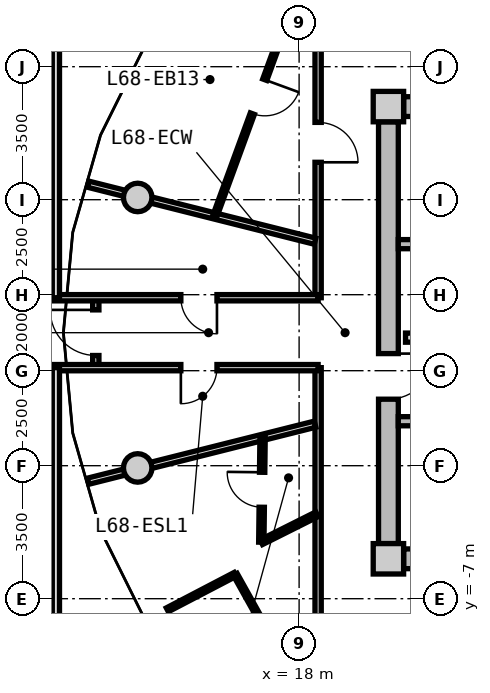
"""IFC4 building model, lengths in metres.
Left out: names, types, materials, properties, quantities, classifications, styles, units other than length and angle.
Written with IfcOpenShell. Run it as: python <this file> out.ifc"""

import sys

from ifc_helpers import new_model, si_unit, direction, frame, frame_2d, origin, origin_2d, place, context, subcontext, project, spatial, rectangle, circle, extrude, source, transform, mapped, element, fill, save


model = new_model("IFC4")
c1 = context("Model", 3, precision=1e-05, world=origin(), true_north=direction((0.0, 1.0)))
c2 = subcontext(c1, "Body", "Model", "MODEL_VIEW")
j1 = project(units=[si_unit("LENGTHUNIT", "METRE"), si_unit("PLANEANGLEUNIT", "RADIAN")], contexts=[c1])
p1 = place(None, origin())
s1 = spatial("IfcSite", under=j1, at=p1, CompositionType="ELEMENT")
p2 = place(p1, origin())
s2 = spatial("IfcBuilding", under=s1, at=p2, CompositionType="ELEMENT")
p3 = place(p2, frame((0.0, 0.0, 220.0)))
s3 = spatial("IfcBuildingStorey", under=s2, at=p3, CompositionType="ELEMENT", Elevation=220.0)
m1 = source(origin(), c2, "Body", "SweptSolid", [
    extrude(rectangle(XDim=0.8, YDim=0.8, at=origin_2d()), origin(), (0.0, 0.0, 1.0), 3.05),
])
for number, where, z_axis, x_axis in (
    (1, (20.35, -5.95, 0.0), (0.0, 0.0, 1.0), (1.0, 0.0, 0.0)),
    (2, (20.35, 5.95, 0.0), (0.0, 0.0, 1.0), (1.0, 0.0, 0.0)),
):
    element("IfcColumn", number, at=place(p3, frame(where, z_axis=z_axis, x_axis=x_axis)), inside=s3, PredefinedType="COLUMN", context=c2, shape_type="MappedRepresentation", body=[
        mapped(m1, transform((0.0, 0.0, 0.0), x_axis=(1.0, 0.0, 0.0), y_axis=(0.0, 1.0, 0.0), z_axis=(0.0, 0.0, 1.0), scale=1.0)),
    ])
m2 = source(origin(), c2, "Body", "SweptSolid", [
    extrude(rectangle(XDim=14.5, YDim=0.52, at=frame_2d((7.25, 0.0))), origin(), (0.0, 0.0, 1.0), 2.76),
])
for number, where, z_axis, x_axis in (
    (3, (20.75, 5.95, 0.0), (0.0, 0.0, 1.0), (1.0, 0.0, 0.0)),
    (4, (35.25, -5.95, 0.0), (0.0, 0.0, 1.0), (-1.0, 0.0, 0.0)),
):
    element("IfcWall", number, at=place(p3, frame(where, z_axis=z_axis, x_axis=x_axis)), inside=s3, PredefinedType="SHEAR", context=c2, shape_type="MappedRepresentation", body=[
        mapped(m2, transform((0.0, 0.0, 0.0), x_axis=(1.0, 0.0, 0.0), y_axis=(0.0, 1.0, 0.0), z_axis=(0.0, 0.0, 1.0), scale=1.0)),
    ])
m3 = source(origin(), c2, "Body", "SweptSolid", [
    extrude(rectangle(XDim=11.1, YDim=0.52, at=frame_2d((5.55, 0.0))), origin(), (0.0, 0.0, 1.0), 2.76),
])
p4 = place(p3, frame((20.35, -5.55, 0.0), z_axis=(0.0, 0.0, 1.0), x_axis=(0.0, 1.0, 0.0)))
e5 = element("IfcWall", 5, at=p4, inside=s3, PredefinedType="SHEAR", context=c2, shape_type="MappedRepresentation", body=[
    mapped(m3, transform((0.0, 0.0, 0.0), x_axis=(1.0, 0.0, 0.0), y_axis=(0.0, 1.0, 0.0), z_axis=(0.0, 0.0, 1.0), scale=1.0)),
])
p5 = place(p4, frame((3.8, 0.0, 0.0)))
e6 = element("IfcOpeningElement", 6, at=p5, cuts=e5, PredefinedType="OPENING", context=c2, shape_type="SweptSolid", body=[
    extrude(rectangle(XDim=1.2, YDim=2.15, at=frame_2d((0.6, 1.075))), frame((0.0, 0.27, 0.0), z_axis=(0.0, -1.0, 0.0), x_axis=(1.0, 0.0, 0.0)), (0.0, 0.0, 1.0), 0.54),
])
m4 = source(origin(), c2, "Body", "SweptSolid", [
    extrude(circle(Radius=0.375, at=origin_2d()), origin(), (0.0, 0.0, 1.0), 3.05),
])
for number, where, z_axis, x_axis in (
    (7, (13.753, 3.559, 0.0), (0.0, 0.0, 1.0), (1.0, 0.0, 0.0)),
    (8, (13.753, -3.559, 0.0), (0.0, 0.0, 1.0), (1.0, 0.0, 0.0)),
):
    element("IfcColumn", number, at=place(p3, frame(where, z_axis=z_axis, x_axis=x_axis)), inside=s3, PredefinedType="COLUMN", context=c2, shape_type="MappedRepresentation", body=[
        mapped(m4, transform((0.0, 0.0, 0.0), x_axis=(1.0, 0.0, 0.0), y_axis=(0.0, 1.0, 0.0), z_axis=(0.0, 0.0, 1.0), scale=1.0)),
    ])
m5 = source(origin(), c2, "Body", "SweptSolid", [
    extrude(rectangle(XDim=7.93, YDim=0.24, at=frame_2d((3.965, 0.0))), origin(), (0.0, 0.0, 1.0), 2.76),
])
p6 = place(p3, frame((20.61, 2.33, 0.0), z_axis=(0.0, 0.0, 1.0), x_axis=(1.0, 0.0, 0.0)))
e9 = element("IfcWall", 9, at=p6, inside=s3, PredefinedType="PARTITIONING", context=c2, shape_type="MappedRepresentation", body=[
    mapped(m5, transform((0.0, 0.0, 0.0), x_axis=(1.0, 0.0, 0.0), y_axis=(0.0, 1.0, 0.0), z_axis=(0.0, 0.0, 1.0), scale=1.0)),
])
p7 = place(p3, frame((20.61, -2.33, 0.0), z_axis=(0.0, 0.0, 1.0), x_axis=(1.0, 0.0, 0.0)))
e10 = element("IfcWall", 10, at=p7, inside=s3, PredefinedType="PARTITIONING", context=c2, shape_type="MappedRepresentation", body=[
    mapped(m5, transform((0.0, 0.0, 0.0), x_axis=(1.0, 0.0, 0.0), y_axis=(0.0, 1.0, 0.0), z_axis=(0.0, 0.0, 1.0), scale=1.0)),
])
p8 = place(p7, frame((1.05, 0.0, 0.0)))
e11 = element("IfcOpeningElement", 11, at=p8, cuts=e10, PredefinedType="OPENING", context=c2, shape_type="SweptSolid", body=[
    extrude(rectangle(XDim=1.1, YDim=2.15, at=frame_2d((0.55, 1.075))), frame((0.0, 0.13, 0.0), z_axis=(0.0, -1.0, 0.0), x_axis=(1.0, 0.0, 0.0)), (0.0, 0.0, 1.0), 0.26),
])
m6 = source(origin(), c2, "Body", "SweptSolid", [
    extrude(rectangle(XDim=7.62, YDim=0.24, at=frame_2d((3.81, 0.0))), origin(), (0.0, 0.0, 1.0), 2.745),
])
p9 = place(p3, frame((20.8, -0.13, 0.0), z_axis=(0.0, 0.0, 1.0), x_axis=(1.0, 0.0, 0.0)))
e12 = element("IfcWall", 12, at=p9, inside=s3, PredefinedType="PARTITIONING", context=c2, shape_type="MappedRepresentation", body=[
    mapped(m6, transform((0.0, 0.0, 0.0), x_axis=(1.0, 0.0, 0.0), y_axis=(0.0, 1.0, 0.0), z_axis=(0.0, 0.0, 1.0), scale=1.0)),
])
p10 = place(p9, frame((6.22, 0.0, 0.0)))
e13 = element("IfcOpeningElement", 13, at=p10, cuts=e12, PredefinedType="OPENING", context=c2, shape_type="SweptSolid", body=[
    extrude(rectangle(XDim=1.0, YDim=2.1, at=frame_2d((0.5, 1.05))), frame((0.0, 0.13, 0.0), z_axis=(0.0, -1.0, 0.0), x_axis=(1.0, 0.0, 0.0)), (0.0, 0.0, 1.0), 0.26),
])
p11 = place(p9, frame((2.4, 0.0, 0.0)))
e14 = element("IfcOpeningElement", 14, at=p11, cuts=e12, PredefinedType="OPENING", context=c2, shape_type="SweptSolid", body=[
    extrude(rectangle(XDim=1.0, YDim=2.1, at=frame_2d((0.5, 1.05))), frame((0.0, 0.13, 0.0), z_axis=(0.0, -1.0, 0.0), x_axis=(1.0, 0.0, 0.0)), (0.0, 0.0, 1.0), 0.26),
])
m7 = source(origin(), c2, "Body", "SweptSolid", [
    extrude(rectangle(XDim=6.88, YDim=0.165, at=frame_2d((3.44, 0.0))), origin(), (0.0, 0.0, 1.0), 2.745),
])
p12 = place(p3, frame((18.5, -7.8, 0.0), z_axis=(0.0, 0.0, 1.0), x_axis=(0.0, 1.0, 0.0)))
e15 = element("IfcWall", 15, at=p12, inside=s3, PredefinedType="PARTITIONING", context=c2, shape_type="MappedRepresentation", body=[
    mapped(m7, transform((0.0, 0.0, 0.0), x_axis=(1.0, 0.0, 0.0), y_axis=(0.0, 1.0, 0.0), z_axis=(0.0, 0.0, 1.0), scale=1.0)),
])
p13 = place(p3, frame((18.5, 0.92, 0.0), z_axis=(0.0, 0.0, 1.0), x_axis=(0.0, 1.0, 0.0)))
e16 = element("IfcWall", 16, at=p13, inside=s3, PredefinedType="PARTITIONING", context=c2, shape_type="MappedRepresentation", body=[
    mapped(m7, transform((0.0, 0.0, 0.0), x_axis=(1.0, 0.0, 0.0), y_axis=(0.0, 1.0, 0.0), z_axis=(0.0, 0.0, 1.0), scale=1.0)),
])
p14 = place(p13, frame((3.564, 0.0, 0.0)))
e17 = element("IfcOpeningElement", 17, at=p14, cuts=e16, PredefinedType="OPENING", context=c2, shape_type="SweptSolid", body=[
    extrude(rectangle(XDim=1.05, YDim=2.15, at=frame_2d((0.525, 1.075))), frame((0.0, 0.093, 0.0), z_axis=(0.0, -1.0, 0.0), x_axis=(1.0, 0.0, 0.0)), (0.0, 0.0, 1.0), 0.185),
])
m8 = source(origin(), c2, "Body", "SweptSolid", [
    extrude(rectangle(XDim=6.157, YDim=0.165, at=frame_2d((3.079, 0.0))), origin(), (0.0, 0.0, 1.0), 2.345),
])
for number, where, z_axis, x_axis in (
    (18, (18.42, 2.407, 0.0), (0.0, 0.0, 1.0), (-0.97, 0.244, 0.0)),
    (19, (18.42, -2.407, 0.0), (0.0, 0.0, 1.0), (-0.97, -0.244, 0.0)),
):
    element("IfcWall", number, at=place(p3, frame(where, z_axis=z_axis, x_axis=x_axis)), inside=s3, PredefinedType="PARTITIONING", context=c2, shape_type="MappedRepresentation", body=[
        mapped(m8, transform((0.0, 0.0, 0.0), x_axis=(1.0, 0.0, 0.0), y_axis=(0.0, 1.0, 0.0), z_axis=(0.0, 0.0, 1.0), scale=1.0)),
    ])
m9 = source(origin(), c2, "Body", "SweptSolid", [
    extrude(rectangle(XDim=6.69, YDim=0.115, at=frame_2d((3.345, 0.0))), origin(), (0.0, 0.0, 1.0), 2.745),
])
p15 = place(p3, frame((18.083, 9.352, 0.0), z_axis=(0.0, 0.0, 1.0), x_axis=(-0.343693784919, -0.939081776102, 0.0)))
e20 = element("IfcWall", 20, at=p15, inside=s3, PredefinedType="PARTITIONING", context=c2, shape_type="MappedRepresentation", body=[
    mapped(m9, transform((0.0, 0.0, 0.0), x_axis=(1.0, 0.0, 0.0), y_axis=(0.0, 1.0, 0.0), z_axis=(0.0, 0.0, 1.0), scale=1.0)),
])
p16 = place(p15, frame((2.87, 0.0, 0.0)))
e21 = element("IfcOpeningElement", 21, at=p16, cuts=e20, PredefinedType="OPENING", context=c2, shape_type="SweptSolid", body=[
    extrude(rectangle(XDim=0.95, YDim=2.1, at=frame_2d((0.475, 1.05))), frame((0.0, 0.067, 0.0), z_axis=(0.0, -1.0, 0.0), x_axis=(1.0, 0.0, 0.0)), (0.0, 0.0, 1.0), 0.135),
])
m10 = source(origin(), c2, "Body", "SweptSolid", [
    extrude(rectangle(XDim=1.638, YDim=0.14, at=frame_2d((0.819, 0.0))), origin(), (0.0, 0.0, 1.0), 2.745),
])
p17 = place(p3, frame((18.47, -4.778, 0.0), z_axis=(0.0, 0.0, 1.0), x_axis=(-0.893919977945, -0.448226586707, 0.0)))
e22 = element("IfcWall", 22, at=p17, inside=s3, PredefinedType="PARTITIONING", context=c2, shape_type="MappedRepresentation", body=[
    mapped(m10, transform((0.0, 0.0, 0.0), x_axis=(1.0, 0.0, 0.0), y_axis=(0.0, 1.0, 0.0), z_axis=(0.0, 0.0, 1.0), scale=1.0)),
])
m11 = source(origin(), c2, "Body", "SweptSolid", [
    extrude(rectangle(XDim=2.759, YDim=0.14, at=frame_2d((1.379, 0.0))), origin(), (0.0, 0.0, 1.0), 2.745),
])
p18 = place(p3, frame((17.005, -5.513, 0.0), z_axis=(0.0, 0.0, 1.0), x_axis=(0.01194710728, 0.999928630767, 0.0)))
e23 = element("IfcWall", 23, at=p18, inside=s3, PredefinedType="PARTITIONING", context=c2, shape_type="MappedRepresentation", body=[
    mapped(m11, transform((0.0, 0.0, 0.0), x_axis=(1.0, 0.0, 0.0), y_axis=(0.0, 1.0, 0.0), z_axis=(0.0, 0.0, 1.0), scale=1.0)),
])
p19 = place(p18, frame((0.919, 0.0, 0.0)))
e24 = element("IfcOpeningElement", 24, at=p19, cuts=e23, PredefinedType="OPENING", context=c2, shape_type="SweptSolid", body=[
    extrude(rectangle(XDim=0.92, YDim=2.1, at=frame_2d((0.46, 1.05))), frame((0.0, 0.08, 0.0), z_axis=(0.0, -1.0, 0.0), x_axis=(1.0, 0.0, 0.0)), (0.0, 0.0, 1.0), 0.16),
])
m12 = source(origin(), c2, "Body", "SweptSolid", [
    extrude(rectangle(XDim=2.015, YDim=0.115, at=frame_2d((1.007, 0.0))), origin(), (0.0, 0.0, 1.0), 2.745),
])
p20 = place(p3, frame((16.318, -6.36, 0.0), z_axis=(0.0, 0.0, 1.0), x_axis=(-0.886437892009, -0.462847559797, 0.0)))
e25 = element("IfcWall", 25, at=p20, inside=s3, PredefinedType="PARTITIONING", context=c2, shape_type="MappedRepresentation", body=[
    mapped(m12, transform((0.0, 0.0, 0.0), x_axis=(1.0, 0.0, 0.0), y_axis=(0.0, 1.0, 0.0), z_axis=(0.0, 0.0, 1.0), scale=1.0)),
])
m13 = source(origin(), c2, "Body", "SweptSolid", [
    extrude(rectangle(XDim=3.493, YDim=0.115, at=frame_2d((1.746, 0.0))), origin(), (0.0, 0.0, 1.0), 2.745),
])
p21 = place(p3, frame((16.318, -6.36, 0.0), z_axis=(0.0, 0.0, 1.0), x_axis=(0.487896553961, -0.872901456427, 0.0)))
e26 = element("IfcWall", 26, at=p21, inside=s3, PredefinedType="PARTITIONING", context=c2, shape_type="MappedRepresentation", body=[
    mapped(m13, transform((0.0, 0.0, 0.0), x_axis=(1.0, 0.0, 0.0), y_axis=(0.0, 1.0, 0.0), z_axis=(0.0, 0.0, 1.0), scale=1.0)),
])
p22 = place(p21, frame((1.271, 0.0, 0.0)))
e27 = element("IfcOpeningElement", 27, at=p22, cuts=e26, PredefinedType="OPENING", context=c2, shape_type="SweptSolid", body=[
    extrude(rectangle(XDim=0.95, YDim=2.1, at=frame_2d((0.475, 1.05))), frame((0.0, 0.067, 0.0), z_axis=(0.0, -1.0, 0.0), x_axis=(1.0, 0.0, 0.0)), (0.0, 0.0, 1.0), 0.135),
])
m14 = source(origin(), c2, "Body", "SweptSolid", [
    extrude(rectangle(XDim=1.84, YDim=0.165, at=frame_2d((0.92, 0.0))), origin(), (0.0, 0.0, 1.0), 2.745),
])
p23 = place(p3, frame((12.65, -0.92, 0.0), z_axis=(0.0, 0.0, 1.0), x_axis=(0.0, 1.0, 0.0)))
e28 = element("IfcWall", 28, at=p23, inside=s3, PredefinedType="PARTITIONING", context=c2, shape_type="MappedRepresentation", body=[
    mapped(m14, transform((0.0, 0.0, 0.0), x_axis=(1.0, 0.0, 0.0), y_axis=(0.0, 1.0, 0.0), z_axis=(0.0, 0.0, 1.0), scale=1.0)),
])
p24 = place(p23, frame((0.32, 0.0, 0.0)))
e29 = element("IfcOpeningElement", 29, at=p24, cuts=e28, PredefinedType="OPENING", context=c2, shape_type="SweptSolid", body=[
    extrude(rectangle(XDim=1.2, YDim=2.15, at=frame_2d((0.6, 1.075))), frame((0.0, 0.093, 0.0), z_axis=(0.0, -1.0, 0.0), x_axis=(1.0, 0.0, 0.0)), (0.0, 0.0, 1.0), 0.185),
])
m15 = source(origin(), c2, "Body", "SweptSolid", [
    extrude(rectangle(XDim=37.0, YDim=0.165, at=frame_2d((18.5, 0.0))), origin(), (0.0, 0.0, 1.0), 2.745),
])
p25 = place(p3, frame((-18.5, -0.92, 0.0), z_axis=(0.0, 0.0, 1.0), x_axis=(1.0, 0.0, 0.0)))
e30 = element("IfcWall", 30, at=p25, inside=s3, PredefinedType="PARTITIONING", context=c2, shape_type="MappedRepresentation", body=[
    mapped(m15, transform((0.0, 0.0, 0.0), x_axis=(1.0, 0.0, 0.0), y_axis=(0.0, 1.0, 0.0), z_axis=(0.0, 0.0, 1.0), scale=1.0)),
])
p26 = place(p25, frame((2.662, 0.0, 0.0)))
e31 = element("IfcOpeningElement", 31, at=p26, cuts=e30, PredefinedType="OPENING", context=c2, shape_type="SweptSolid", body=[
    extrude(rectangle(XDim=0.95, YDim=2.1, at=frame_2d((0.475, 1.05))), frame((0.0, 0.093, 0.0), z_axis=(0.0, -1.0, 0.0), x_axis=(1.0, 0.0, 0.0)), (0.0, 0.0, 1.0), 0.185),
])
p27 = place(p25, frame((33.388, 0.0, 0.0)))
e32 = element("IfcOpeningElement", 32, at=p27, cuts=e30, PredefinedType="OPENING", context=c2, shape_type="SweptSolid", body=[
    extrude(rectangle(XDim=0.95, YDim=2.1, at=frame_2d((0.475, 1.05))), frame((0.0, 0.093, 0.0), z_axis=(0.0, -1.0, 0.0), x_axis=(1.0, 0.0, 0.0)), (0.0, 0.0, 1.0), 0.185),
])
p28 = place(p25, frame((9.075, 0.0, 0.0)))
e33 = element("IfcOpeningElement", 33, at=p28, cuts=e30, PredefinedType="OPENING", context=c2, shape_type="SweptSolid", body=[
    extrude(rectangle(XDim=1.25, YDim=2.2, at=frame_2d((0.625, 1.1))), frame((0.0, 0.093, 0.0), z_axis=(0.0, -1.0, 0.0), x_axis=(1.0, 0.0, 0.0)), (0.0, 0.0, 1.0), 0.185),
])
p29 = place(p25, frame((14.875, 0.0, 0.0)))
e34 = element("IfcOpeningElement", 34, at=p29, cuts=e30, PredefinedType="OPENING", context=c2, shape_type="SweptSolid", body=[
    extrude(rectangle(XDim=1.25, YDim=2.2, at=frame_2d((0.625, 1.1))), frame((0.0, 0.093, 0.0), z_axis=(0.0, -1.0, 0.0), x_axis=(1.0, 0.0, 0.0)), (0.0, 0.0, 1.0), 0.185),
])
p30 = place(p25, frame((23.03, 0.0, 0.0)))
e35 = element("IfcOpeningElement", 35, at=p30, cuts=e30, PredefinedType="OPENING", context=c2, shape_type="SweptSolid", body=[
    extrude(rectangle(XDim=1.25, YDim=2.2, at=frame_2d((0.625, 1.1))), frame((0.0, 0.093, 0.0), z_axis=(0.0, -1.0, 0.0), x_axis=(1.0, 0.0, 0.0)), (0.0, 0.0, 1.0), 0.185),
])
p31 = place(p3, frame((-18.5, 0.92, 0.0), z_axis=(0.0, 0.0, 1.0), x_axis=(1.0, 0.0, 0.0)))
e36 = element("IfcWall", 36, at=p31, inside=s3, PredefinedType="PARTITIONING", context=c2, shape_type="MappedRepresentation", body=[
    mapped(m15, transform((0.0, 0.0, 0.0), x_axis=(1.0, 0.0, 0.0), y_axis=(0.0, 1.0, 0.0), z_axis=(0.0, 0.0, 1.0), scale=1.0)),
])
p32 = place(p31, frame((2.662, 0.0, 0.0)))
e37 = element("IfcOpeningElement", 37, at=p32, cuts=e36, PredefinedType="OPENING", context=c2, shape_type="SweptSolid", body=[
    extrude(rectangle(XDim=0.95, YDim=2.1, at=frame_2d((0.475, 1.05))), frame((0.0, 0.093, 0.0), z_axis=(0.0, -1.0, 0.0), x_axis=(1.0, 0.0, 0.0)), (0.0, 0.0, 1.0), 0.185),
])
p33 = place(p31, frame((33.388, 0.0, 0.0)))
e38 = element("IfcOpeningElement", 38, at=p33, cuts=e36, PredefinedType="OPENING", context=c2, shape_type="SweptSolid", body=[
    extrude(rectangle(XDim=0.95, YDim=2.1, at=frame_2d((0.475, 1.05))), frame((0.0, 0.093, 0.0), z_axis=(0.0, -1.0, 0.0), x_axis=(1.0, 0.0, 0.0)), (0.0, 0.0, 1.0), 0.185),
])
p34 = place(p31, frame((7.64, 0.0, 0.0)))
e39 = element("IfcOpeningElement", 39, at=p34, cuts=e36, PredefinedType="OPENING", context=c2, shape_type="SweptSolid", body=[
    extrude(rectangle(XDim=0.92, YDim=2.1, at=frame_2d((0.46, 1.05))), frame((0.0, 0.093, 0.0), z_axis=(0.0, -1.0, 0.0), x_axis=(1.0, 0.0, 0.0)), (0.0, 0.0, 1.0), 0.185),
])
p35 = place(p31, frame((10.275, 0.0, 0.0)))
e40 = element("IfcOpeningElement", 40, at=p35, cuts=e36, PredefinedType="OPENING", context=c2, shape_type="SweptSolid", body=[
    extrude(rectangle(XDim=1.25, YDim=2.2, at=frame_2d((0.625, 1.1))), frame((0.0, 0.093, 0.0), z_axis=(0.0, -1.0, 0.0), x_axis=(1.0, 0.0, 0.0)), (0.0, 0.0, 1.0), 0.185),
])
p36 = place(p31, frame((14.875, 0.0, 0.0)))
e41 = element("IfcOpeningElement", 41, at=p36, cuts=e36, PredefinedType="OPENING", context=c2, shape_type="SweptSolid", body=[
    extrude(rectangle(XDim=1.25, YDim=2.2, at=frame_2d((0.625, 1.1))), frame((0.0, 0.093, 0.0), z_axis=(0.0, -1.0, 0.0), x_axis=(1.0, 0.0, 0.0)), (0.0, 0.0, 1.0), 0.185),
])
p37 = place(p31, frame((23.03, 0.0, 0.0)))
e42 = element("IfcOpeningElement", 42, at=p37, cuts=e36, PredefinedType="OPENING", context=c2, shape_type="SweptSolid", body=[
    extrude(rectangle(XDim=1.25, YDim=2.2, at=frame_2d((0.625, 1.1))), frame((0.0, 0.093, 0.0), z_axis=(0.0, -1.0, 0.0), x_axis=(1.0, 0.0, 0.0)), (0.0, 0.0, 1.0), 0.185),
])
m16 = source(origin(), c2, "Body", "SweptSolid", [
    extrude(rectangle(XDim=9.88, YDim=0.19, at=frame_2d((4.94, 0.0))), origin(), (0.0, 0.0, 1.0), 2.745),
])
for number, where, z_axis, x_axis in (
    (43, (11.6, -10.8, 0.0), (0.0, 0.0, 1.0), (0.0, 1.0, 0.0)),
    (44, (11.6, 0.92, 0.0), (0.0, 0.0, 1.0), (0.0, 1.0, 0.0)),
):
    element("IfcWall", number, at=place(p3, frame(where, z_axis=z_axis, x_axis=x_axis)), inside=s3, PredefinedType="PARTITIONING", context=c2, shape_type="MappedRepresentation", body=[
        mapped(m16, transform((0.0, 0.0, 0.0), x_axis=(1.0, 0.0, 0.0), y_axis=(0.0, 1.0, 0.0), z_axis=(0.0, 0.0, 1.0), scale=1.0)),
    ])
m17 = source(origin(), c2, "Body", "SweptSolid", [
    extrude(rectangle(XDim=1.2, YDim=2.15, at=frame_2d((0.6, 1.075))), frame((0.0, 0.025, 0.0), z_axis=(0.0, -1.0, 0.0), x_axis=(1.0, 0.0, 0.0)), (0.0, 0.0, 1.0), 0.05),
])
p38 = place(p5, frame((1.2, 0.0, 0.0), z_axis=(0.0, 0.0, 1.0), x_axis=(-1.0, 0.0, 0.0)))
e45 = element("IfcDoor", 45, at=p38, inside=s3, OperationType="SINGLE_SWING_LEFT", PredefinedType="DOOR", context=c2, shape_type="MappedRepresentation", body=[
    mapped(m17, transform((0.0, 0.0, 0.0), x_axis=(1.0, 0.0, 0.0), y_axis=(0.0, 1.0, 0.0), z_axis=(0.0, 0.0, 1.0), scale=1.0)),
])
fill(e6, e45)
m18 = source(origin(), c2, "Body", "SweptSolid", [
    extrude(rectangle(XDim=0.95, YDim=2.1, at=frame_2d((0.475, 1.05))), frame((0.0, 0.025, 0.0), z_axis=(0.0, -1.0, 0.0), x_axis=(1.0, 0.0, 0.0)), (0.0, 0.0, 1.0), 0.05),
])
p39 = place(p27, frame((0.95, 0.0, 0.0), z_axis=(0.0, 0.0, 1.0), x_axis=(-1.0, 0.0, 0.0)))
e46 = element("IfcDoor", 46, at=p39, inside=s3, OperationType="SINGLE_SWING_RIGHT", PredefinedType="DOOR", context=c2, shape_type="MappedRepresentation", body=[
    mapped(m18, transform((0.0, 0.0, 0.0), x_axis=(1.0, 0.0, 0.0), y_axis=(0.0, 1.0, 0.0), z_axis=(0.0, 0.0, 1.0), scale=1.0)),
])
fill(e32, e46)
p40 = place(p33, frame((0.95, 0.0, 0.0), z_axis=(0.0, 0.0, 1.0), x_axis=(-1.0, 0.0, 0.0)))
e47 = element("IfcDoor", 47, at=p40, inside=s3, OperationType="SINGLE_SWING_LEFT", PredefinedType="DOOR", context=c2, shape_type="MappedRepresentation", body=[
    mapped(m18, transform((0.0, 0.0, 0.0), x_axis=(1.0, 0.0, 0.0), y_axis=(0.0, 1.0, 0.0), z_axis=(0.0, 0.0, 1.0), scale=1.0)),
])
fill(e38, e47)
m19 = source(origin(), c2, "Body", "SweptSolid", [
    extrude(rectangle(XDim=1.05, YDim=2.15, at=frame_2d((0.525, 1.075))), frame((0.0, 0.025, 0.0), z_axis=(0.0, -1.0, 0.0), x_axis=(1.0, 0.0, 0.0)), (0.0, 0.0, 1.0), 0.05),
])
p41 = place(p14, frame((1.05, 0.0, 0.0), z_axis=(0.0, 0.0, 1.0), x_axis=(-1.0, 0.0, 0.0)))
e48 = element("IfcDoor", 48, at=p41, inside=s3, OperationType="SINGLE_SWING_RIGHT", PredefinedType="DOOR", context=c2, shape_type="MappedRepresentation", body=[
    mapped(m19, transform((0.0, 0.0, 0.0), x_axis=(1.0, 0.0, 0.0), y_axis=(0.0, 1.0, 0.0), z_axis=(0.0, 0.0, 1.0), scale=1.0)),
])
fill(e17, e48)
p42 = place(p16, origin())
e49 = element("IfcDoor", 49, at=p42, inside=s3, OperationType="SINGLE_SWING_LEFT", PredefinedType="DOOR", context=c2, shape_type="MappedRepresentation", body=[
    mapped(m18, transform((0.0, 0.0, 0.0), x_axis=(1.0, 0.0, 0.0), y_axis=(0.0, 1.0, 0.0), z_axis=(0.0, 0.0, 1.0), scale=1.0)),
])
fill(e21, e49)
m20 = source(origin(), c2, "Body", "SweptSolid", [
    extrude(rectangle(XDim=0.92, YDim=2.1, at=frame_2d((0.46, 1.05))), frame((0.0, 0.025, 0.0), z_axis=(0.0, -1.0, 0.0), x_axis=(1.0, 0.0, 0.0)), (0.0, 0.0, 1.0), 0.05),
])
p43 = place(p19, origin())
e50 = element("IfcDoor", 50, at=p43, inside=s3, OperationType="SINGLE_SWING_RIGHT", PredefinedType="DOOR", context=c2, shape_type="MappedRepresentation", body=[
    mapped(m20, transform((0.0, 0.0, 0.0), x_axis=(1.0, 0.0, 0.0), y_axis=(0.0, 1.0, 0.0), z_axis=(0.0, 0.0, 1.0), scale=1.0)),
])
fill(e24, e50)
p44 = place(p24, origin())
e51 = element("IfcDoor", 51, at=p44, inside=s3, OperationType="SINGLE_SWING_RIGHT", PredefinedType="DOOR", context=c2, shape_type="MappedRepresentation", body=[
    mapped(m17, transform((0.0, 0.0, 0.0), x_axis=(1.0, 0.0, 0.0), y_axis=(0.0, 1.0, 0.0), z_axis=(0.0, 0.0, 1.0), scale=1.0)),
])
fill(e29, e51)
save(model, sys.argv[1])
